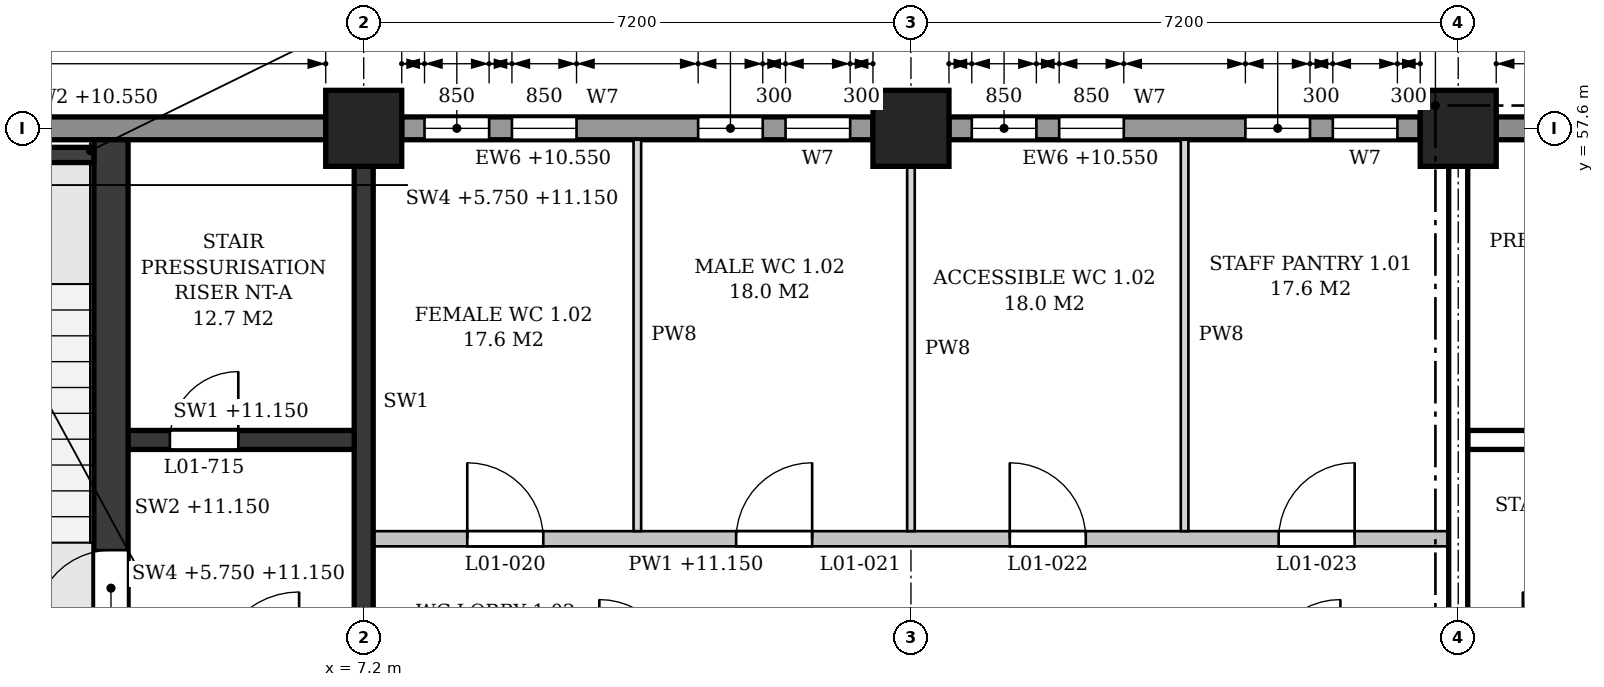
"""IFC4 building model, lengths in metres.
Left out: names, types, materials, properties, quantities, classifications, styles, units other than length and angle.
Written with IfcOpenShell. Run it as: python <this file> out.ifc"""

import sys

from ifc_helpers import new_model, si_unit, direction, frame, frame_2d, origin, origin_2d, place, context, subcontext, project, spatial, polyline, rectangle, outline, extrude, element, fill, save


model = new_model("IFC4")
c1 = context("Model", 3, precision=1e-05, world=origin(), true_north=direction((0.0, 1.0)))
c2 = subcontext(c1, "Body", "Model", "MODEL_VIEW")
j1 = project(units=[si_unit("LENGTHUNIT", "METRE"), si_unit("PLANEANGLEUNIT", "RADIAN")], contexts=[c1])
p1 = place(None, origin())
s1 = spatial("IfcSite", under=j1, at=p1, CompositionType="ELEMENT")
p2 = place(p1, origin())
s2 = spatial("IfcBuilding", under=s1, at=p2, CompositionType="ELEMENT")
p3 = place(p2, frame((0.0, 0.0, 6.0)))
s3 = spatial("IfcBuildingStorey", under=s2, at=p3, CompositionType="ELEMENT", Elevation=6.0)
for number, where, z_axis, x_axis in (
    (1, (7.2, 57.6, 0.0), (0.0, 0.0, 1.0), (1.0, 0.0, 0.0)),
    (2, (14.4, 57.6, 0.0), (0.0, 0.0, 1.0), (1.0, 0.0, 0.0)),
    (3, (21.6, 57.6, 0.0), (0.0, 0.0, 1.0), (1.0, 0.0, 0.0)),
):
    element("IfcColumn", number, at=place(p3, frame(where, z_axis=z_axis, x_axis=x_axis)), inside=s3, PredefinedType="COLUMN", context=c2, shape_type="SweptSolid", body=[
        extrude(rectangle(XDim=1.0, YDim=1.0, at=origin_2d()), origin(), (0.0, 0.0, 1.0), 5.4),
    ])
p4 = place(p3, frame((28.3, 57.6, 0.0), z_axis=(0.0, 0.0, 1.0), x_axis=(-1.0, 0.0, 0.0)))
e4 = element("IfcWall", 4, at=p4, inside=s3, PredefinedType="STANDARD", context=c2, shape_type="SweptSolid", body=[
    extrude(rectangle(XDim=6.2, YDim=0.3, at=frame_2d((3.1, 0.0))), origin(), (0.0, 0.0, 1.0), 4.55),
])
p5 = place(p4, frame((0.85, 0.0, 0.9)))
e5 = element("IfcOpeningElement", 5, at=p5, cuts=e4, PredefinedType="OPENING", context=c2, shape_type="SweptSolid", body=[
    extrude(outline(polyline([(0.0, 0.0), (0.9, 0.0), (0.9, 3.15), (0.45, 3.6), (0.0, 3.15), (0.0, 0.0)])), frame((0.0, 0.16, 0.0), z_axis=(0.0, -1.0, 0.0), x_axis=(1.0, 0.0, 0.0)), (0.0, 0.0, 1.0), 0.32),
])
p6 = place(p3, frame((21.1, 57.6, 0.0), z_axis=(0.0, 0.0, 1.0), x_axis=(-1.0, 0.0, 0.0)))
e6 = element("IfcWall", 6, at=p6, inside=s3, PredefinedType="STANDARD", context=c2, shape_type="SweptSolid", body=[
    extrude(rectangle(XDim=6.2, YDim=0.3, at=frame_2d((3.1, 0.0))), origin(), (0.0, 0.0, 1.0), 4.55),
])
p7 = place(p6, frame((0.3, 0.0, 0.9)))
e7 = element("IfcOpeningElement", 7, at=p7, cuts=e6, PredefinedType="OPENING", context=c2, shape_type="SweptSolid", body=[
    extrude(outline(polyline([(0.0, 0.0), (0.85, 0.0), (0.85, 3.15), (0.425, 3.6), (0.0, 3.15), (0.0, 0.0)])), frame((0.0, 0.16, 0.0), z_axis=(0.0, -1.0, 0.0), x_axis=(1.0, 0.0, 0.0)), (0.0, 0.0, 1.0), 0.32),
])
p8 = place(p6, frame((1.45, 0.0, 0.9)))
e8 = element("IfcOpeningElement", 8, at=p8, cuts=e6, PredefinedType="OPENING", context=c2, shape_type="SweptSolid", body=[
    extrude(outline(polyline([(0.0, 0.0), (0.85, 0.0), (0.85, 3.15), (0.425, 3.6), (0.0, 3.15), (0.0, 0.0)])), frame((0.0, 0.16, 0.0), z_axis=(0.0, -1.0, 0.0), x_axis=(1.0, 0.0, 0.0)), (0.0, 0.0, 1.0), 0.32),
])
p9 = place(p6, frame((3.9, 0.0, 0.9)))
e9 = element("IfcOpeningElement", 9, at=p9, cuts=e6, PredefinedType="OPENING", context=c2, shape_type="SweptSolid", body=[
    extrude(outline(polyline([(0.0, 0.0), (0.85, 0.0), (0.85, 3.15), (0.425, 3.6), (0.0, 3.15), (0.0, 0.0)])), frame((0.0, 0.16, 0.0), z_axis=(0.0, -1.0, 0.0), x_axis=(1.0, 0.0, 0.0)), (0.0, 0.0, 1.0), 0.32),
])
p10 = place(p6, frame((5.05, 0.0, 0.9)))
e10 = element("IfcOpeningElement", 10, at=p10, cuts=e6, PredefinedType="OPENING", context=c2, shape_type="SweptSolid", body=[
    extrude(outline(polyline([(0.0, 0.0), (0.85, 0.0), (0.85, 3.15), (0.425, 3.6), (0.0, 3.15), (0.0, 0.0)])), frame((0.0, 0.16, 0.0), z_axis=(0.0, -1.0, 0.0), x_axis=(1.0, 0.0, 0.0)), (0.0, 0.0, 1.0), 0.32),
])
p11 = place(p3, frame((13.9, 57.6, 0.0), z_axis=(0.0, 0.0, 1.0), x_axis=(-1.0, 0.0, 0.0)))
e11 = element("IfcWall", 11, at=p11, inside=s3, PredefinedType="STANDARD", context=c2, shape_type="SweptSolid", body=[
    extrude(rectangle(XDim=6.2, YDim=0.3, at=frame_2d((3.1, 0.0))), origin(), (0.0, 0.0, 1.0), 4.55),
])
p12 = place(p11, frame((0.3, 0.0, 0.9)))
e12 = element("IfcOpeningElement", 12, at=p12, cuts=e11, PredefinedType="OPENING", context=c2, shape_type="SweptSolid", body=[
    extrude(outline(polyline([(0.0, 0.0), (0.85, 0.0), (0.85, 3.15), (0.425, 3.6), (0.0, 3.15), (0.0, 0.0)])), frame((0.0, 0.16, 0.0), z_axis=(0.0, -1.0, 0.0), x_axis=(1.0, 0.0, 0.0)), (0.0, 0.0, 1.0), 0.32),
])
p13 = place(p11, frame((1.45, 0.0, 0.9)))
e13 = element("IfcOpeningElement", 13, at=p13, cuts=e11, PredefinedType="OPENING", context=c2, shape_type="SweptSolid", body=[
    extrude(outline(polyline([(0.0, 0.0), (0.85, 0.0), (0.85, 3.15), (0.425, 3.6), (0.0, 3.15), (0.0, 0.0)])), frame((0.0, 0.16, 0.0), z_axis=(0.0, -1.0, 0.0), x_axis=(1.0, 0.0, 0.0)), (0.0, 0.0, 1.0), 0.32),
])
p14 = place(p11, frame((3.9, 0.0, 0.9)))
e14 = element("IfcOpeningElement", 14, at=p14, cuts=e11, PredefinedType="OPENING", context=c2, shape_type="SweptSolid", body=[
    extrude(outline(polyline([(0.0, 0.0), (0.85, 0.0), (0.85, 3.15), (0.425, 3.6), (0.0, 3.15), (0.0, 0.0)])), frame((0.0, 0.16, 0.0), z_axis=(0.0, -1.0, 0.0), x_axis=(1.0, 0.0, 0.0)), (0.0, 0.0, 1.0), 0.32),
])
p15 = place(p11, frame((5.05, 0.0, 0.9)))
e15 = element("IfcOpeningElement", 15, at=p15, cuts=e11, PredefinedType="OPENING", context=c2, shape_type="SweptSolid", body=[
    extrude(outline(polyline([(0.0, 0.0), (0.85, 0.0), (0.85, 3.15), (0.425, 3.6), (0.0, 3.15), (0.0, 0.0)])), frame((0.0, 0.16, 0.0), z_axis=(0.0, -1.0, 0.0), x_axis=(1.0, 0.0, 0.0)), (0.0, 0.0, 1.0), 0.32),
])
p16 = place(p3, frame((6.7, 57.6, 0.0), z_axis=(0.0, 0.0, 1.0), x_axis=(-1.0, 0.0, 0.0)))
e16 = element("IfcWall", 16, at=p16, inside=s3, PredefinedType="STANDARD", context=c2, shape_type="SweptSolid", body=[
    extrude(rectangle(XDim=6.2, YDim=0.3, at=frame_2d((3.1, 0.0))), origin(), (0.0, 0.0, 1.0), 4.55),
])
p17 = place(p16, frame((4.45, 0.0, 0.9)))
e17 = element("IfcOpeningElement", 17, at=p17, cuts=e16, PredefinedType="OPENING", context=c2, shape_type="SweptSolid", body=[
    extrude(outline(polyline([(0.0, 0.0), (0.9, 0.0), (0.9, 3.15), (0.45, 3.6), (0.0, 3.15), (0.0, 0.0)])), frame((0.0, 0.16, 0.0), z_axis=(0.0, -1.0, 0.0), x_axis=(1.0, 0.0, 0.0)), (0.0, 0.0, 1.0), 0.32),
])
p18 = place(p3, frame((7.2, 50.9, 0.0), z_axis=(0.0, 0.0, 1.0), x_axis=(0.0, 1.0, 0.0)))
e18 = element("IfcWall", 18, at=p18, inside=s3, PredefinedType="SHEAR", context=c2, shape_type="SweptSolid", body=[
    extrude(rectangle(XDim=6.2, YDim=0.25, at=frame_2d((3.1, 0.0))), origin(), (0.0, 0.0, 1.0), 4.4),
])
p19 = place(p3, frame((2.25, 57.25, -0.25), z_axis=(0.0, 0.0, 1.0), x_axis=(1.0, 0.0, 0.0)))
e19 = element("IfcWall", 19, at=p19, inside=s3, PredefinedType="SHEAR", context=c2, shape_type="SweptSolid", body=[
    extrude(rectangle(XDim=1.4, YDim=0.2, at=frame_2d((0.7, 0.0))), origin(), (0.0, 0.0, 1.0), 5.4),
])
p20 = place(p3, frame((3.875, 50.525, 0.0), z_axis=(0.0, 0.0, 1.0), x_axis=(0.0, 1.0, 0.0)))
e20 = element("IfcWall", 20, at=p20, inside=s3, PredefinedType="SHEAR", context=c2, shape_type="SweptSolid", body=[
    extrude(rectangle(XDim=6.925, YDim=0.45, at=frame_2d((3.462, 0.0))), origin(), (0.0, 0.0, 1.0), 5.15),
])
p21 = place(p20, frame((0.525, 0.0, 0.0)))
e21 = element("IfcOpeningElement", 21, at=p21, cuts=e20, PredefinedType="OPENING", context=c2, shape_type="SweptSolid", body=[
    extrude(rectangle(XDim=1.0, YDim=2.1, at=frame_2d((0.5, 1.05))), frame((0.0, 0.235, 0.0), z_axis=(0.0, -1.0, 0.0), x_axis=(1.0, 0.0, 0.0)), (0.0, 0.0, 1.0), 0.47),
])
p22 = place(p3, frame((4.1, 53.5, 0.0), z_axis=(0.0, 0.0, 1.0), x_axis=(1.0, 0.0, 0.0)))
e22 = element("IfcWall", 22, at=p22, inside=s3, PredefinedType="SHEAR", context=c2, shape_type="SweptSolid", body=[
    extrude(rectangle(XDim=2.975, YDim=0.25, at=frame_2d((1.487, 0.0))), origin(), (0.0, 0.0, 1.0), 5.15),
])
p23 = place(p22, frame((0.55, 0.0, 0.0)))
e23 = element("IfcOpeningElement", 23, at=p23, cuts=e22, PredefinedType="OPENING", context=c2, shape_type="SweptSolid", body=[
    extrude(rectangle(XDim=0.9, YDim=2.1, at=frame_2d((0.45, 1.05))), frame((0.0, 0.135, 0.0), z_axis=(0.0, -1.0, 0.0), x_axis=(1.0, 0.0, 0.0)), (0.0, 0.0, 1.0), 0.27),
])
p24 = place(p3, frame((21.6, 50.9, 0.0), z_axis=(0.0, 0.0, 1.0), x_axis=(0.0, 1.0, 0.0)))
e24 = element("IfcWall", 24, at=p24, inside=s3, PredefinedType="SHEAR", context=c2, shape_type="SweptSolid", body=[
    extrude(rectangle(XDim=6.2, YDim=0.25, at=frame_2d((3.1, 0.0))), origin(), (0.0, 0.0, 1.0), 4.4),
])
p25 = place(p3, frame((21.725, 53.5, 0.0), z_axis=(0.0, 0.0, 1.0), x_axis=(1.0, 0.0, 0.0)))
e25 = element("IfcWall", 25, at=p25, inside=s3, PredefinedType="SHEAR", context=c2, shape_type="SweptSolid", body=[
    extrude(rectangle(XDim=2.975, YDim=0.25, at=frame_2d((1.487, 0.0))), origin(), (0.0, 0.0, 1.0), 5.15),
])
p26 = place(p25, frame((1.525, 0.0, 0.0)))
e26 = element("IfcOpeningElement", 26, at=p26, cuts=e25, PredefinedType="OPENING", context=c2, shape_type="SweptSolid", body=[
    extrude(rectangle(XDim=0.9, YDim=2.1, at=frame_2d((0.45, 1.05))), frame((0.0, 0.135, 0.0), z_axis=(0.0, -1.0, 0.0), x_axis=(1.0, 0.0, 0.0)), (0.0, 0.0, 1.0), 0.27),
])
p27 = place(p3, frame((7.325, 52.2, 0.0), z_axis=(0.0, 0.0, 1.0), x_axis=(1.0, 0.0, 0.0)))
e27 = element("IfcWall", 27, at=p27, inside=s3, PredefinedType="PARTITIONING", context=c2, shape_type="SweptSolid", body=[
    extrude(outline(polyline([(0.0, 0.0), (14.15, 0.0), (14.15, 4.4), (14.025, 4.4), (14.025, 5.15), (7.325, 5.15), (7.325, 4.4), (6.825, 4.4), (6.825, 5.15), (0.125, 5.15), (0.125, 4.4), (0.0, 4.4), (0.0, 0.0)])), frame((0.0, 0.1, 0.0), z_axis=(0.0, -1.0, 0.0), x_axis=(1.0, 0.0, 0.0)), (0.0, 0.0, 1.0), 0.2),
])
p28 = place(p27, frame((1.238, 0.0, 0.0)))
e28 = element("IfcOpeningElement", 28, at=p28, cuts=e27, PredefinedType="OPENING", context=c2, shape_type="SweptSolid", body=[
    extrude(rectangle(XDim=1.0, YDim=2.1, at=frame_2d((0.5, 1.05))), frame((0.0, 0.11, 0.0), z_axis=(0.0, -1.0, 0.0), x_axis=(1.0, 0.0, 0.0)), (0.0, 0.0, 1.0), 0.22),
])
p29 = place(p27, frame((4.775, 0.0, 0.0)))
e29 = element("IfcOpeningElement", 29, at=p29, cuts=e27, PredefinedType="OPENING", context=c2, shape_type="SweptSolid", body=[
    extrude(rectangle(XDim=1.0, YDim=2.1, at=frame_2d((0.5, 1.05))), frame((0.0, 0.11, 0.0), z_axis=(0.0, -1.0, 0.0), x_axis=(1.0, 0.0, 0.0)), (0.0, 0.0, 1.0), 0.22),
])
p30 = place(p27, frame((8.375, 0.0, 0.0)))
e30 = element("IfcOpeningElement", 30, at=p30, cuts=e27, PredefinedType="OPENING", context=c2, shape_type="SweptSolid", body=[
    extrude(rectangle(XDim=1.0, YDim=2.1, at=frame_2d((0.5, 1.05))), frame((0.0, 0.11, 0.0), z_axis=(0.0, -1.0, 0.0), x_axis=(1.0, 0.0, 0.0)), (0.0, 0.0, 1.0), 0.22),
])
p31 = place(p27, frame((11.913, 0.0, 0.0)))
e31 = element("IfcOpeningElement", 31, at=p31, cuts=e27, PredefinedType="OPENING", context=c2, shape_type="SweptSolid", body=[
    extrude(rectangle(XDim=1.0, YDim=2.1, at=frame_2d((0.5, 1.05))), frame((0.0, 0.11, 0.0), z_axis=(0.0, -1.0, 0.0), x_axis=(1.0, 0.0, 0.0)), (0.0, 0.0, 1.0), 0.22),
])
p32 = place(p3, frame((10.8, 52.3, 0.0), z_axis=(0.0, 0.0, 1.0), x_axis=(0.0, 1.0, 0.0)))
e32 = element("IfcWall", 32, at=p32, inside=s3, PredefinedType="PARTITIONING", context=c2, shape_type="SweptSolid", body=[
    extrude(rectangle(XDim=5.15, YDim=0.1, at=frame_2d((2.575, 0.0))), origin(), (0.0, 0.0, 1.0), 4.4),
])
p33 = place(p3, frame((14.4, 52.3, 0.0), z_axis=(0.0, 0.0, 1.0), x_axis=(0.0, 1.0, 0.0)))
e33 = element("IfcWall", 33, at=p33, inside=s3, PredefinedType="PARTITIONING", context=c2, shape_type="SweptSolid", body=[
    extrude(rectangle(XDim=4.8, YDim=0.1, at=frame_2d((2.4, 0.0))), origin(), (0.0, 0.0, 1.0), 4.4),
])
p34 = place(p3, frame((18.0, 52.3, 0.0), z_axis=(0.0, 0.0, 1.0), x_axis=(0.0, 1.0, 0.0)))
e34 = element("IfcWall", 34, at=p34, inside=s3, PredefinedType="PARTITIONING", context=c2, shape_type="SweptSolid", body=[
    extrude(rectangle(XDim=5.15, YDim=0.1, at=frame_2d((2.575, 0.0))), origin(), (0.0, 0.0, 1.0), 4.4),
])
p35 = place(p7, origin())
e35 = element("IfcWindow", 35, at=p35, inside=s3, PartitioningType="SINGLE_PANEL", PredefinedType="WINDOW", context=c2, shape_type="SweptSolid", body=[
    extrude(outline(polyline([(0.0, 0.0), (0.85, 0.0), (0.85, 3.15), (0.425, 3.6), (0.0, 3.15), (0.0, 0.0)])), frame((0.0, 0.03, 0.0), z_axis=(0.0, -1.0, 0.0), x_axis=(1.0, 0.0, 0.0)), (0.0, 0.0, 1.0), 0.06),
])
fill(e7, e35)
p36 = place(p8, origin())
e36 = element("IfcWindow", 36, at=p36, inside=s3, PartitioningType="SINGLE_PANEL", PredefinedType="WINDOW", context=c2, shape_type="SweptSolid", body=[
    extrude(outline(polyline([(0.0, 0.0), (0.85, 0.0), (0.85, 3.15), (0.425, 3.6), (0.0, 3.15), (0.0, 0.0)])), frame((0.0, 0.03, 0.0), z_axis=(0.0, -1.0, 0.0), x_axis=(1.0, 0.0, 0.0)), (0.0, 0.0, 1.0), 0.06),
])
fill(e8, e36)
p37 = place(p9, origin())
e37 = element("IfcWindow", 37, at=p37, inside=s3, PartitioningType="SINGLE_PANEL", PredefinedType="WINDOW", context=c2, shape_type="SweptSolid", body=[
    extrude(outline(polyline([(0.0, 0.0), (0.85, 0.0), (0.85, 3.15), (0.425, 3.6), (0.0, 3.15), (0.0, 0.0)])), frame((0.0, 0.03, 0.0), z_axis=(0.0, -1.0, 0.0), x_axis=(1.0, 0.0, 0.0)), (0.0, 0.0, 1.0), 0.06),
])
fill(e9, e37)
p38 = place(p10, origin())
e38 = element("IfcWindow", 38, at=p38, inside=s3, PartitioningType="SINGLE_PANEL", PredefinedType="WINDOW", context=c2, shape_type="SweptSolid", body=[
    extrude(outline(polyline([(0.0, 0.0), (0.85, 0.0), (0.85, 3.15), (0.425, 3.6), (0.0, 3.15), (0.0, 0.0)])), frame((0.0, 0.03, 0.0), z_axis=(0.0, -1.0, 0.0), x_axis=(1.0, 0.0, 0.0)), (0.0, 0.0, 1.0), 0.06),
])
fill(e10, e38)
p39 = place(p12, origin())
e39 = element("IfcWindow", 39, at=p39, inside=s3, PartitioningType="SINGLE_PANEL", PredefinedType="WINDOW", context=c2, shape_type="SweptSolid", body=[
    extrude(outline(polyline([(0.0, 0.0), (0.85, 0.0), (0.85, 3.15), (0.425, 3.6), (0.0, 3.15), (0.0, 0.0)])), frame((0.0, 0.03, 0.0), z_axis=(0.0, -1.0, 0.0), x_axis=(1.0, 0.0, 0.0)), (0.0, 0.0, 1.0), 0.06),
])
fill(e12, e39)
p40 = place(p13, origin())
e40 = element("IfcWindow", 40, at=p40, inside=s3, PartitioningType="SINGLE_PANEL", PredefinedType="WINDOW", context=c2, shape_type="SweptSolid", body=[
    extrude(outline(polyline([(0.0, 0.0), (0.85, 0.0), (0.85, 3.15), (0.425, 3.6), (0.0, 3.15), (0.0, 0.0)])), frame((0.0, 0.03, 0.0), z_axis=(0.0, -1.0, 0.0), x_axis=(1.0, 0.0, 0.0)), (0.0, 0.0, 1.0), 0.06),
])
fill(e13, e40)
p41 = place(p14, origin())
e41 = element("IfcWindow", 41, at=p41, inside=s3, PartitioningType="SINGLE_PANEL", PredefinedType="WINDOW", context=c2, shape_type="SweptSolid", body=[
    extrude(outline(polyline([(0.0, 0.0), (0.85, 0.0), (0.85, 3.15), (0.425, 3.6), (0.0, 3.15), (0.0, 0.0)])), frame((0.0, 0.03, 0.0), z_axis=(0.0, -1.0, 0.0), x_axis=(1.0, 0.0, 0.0)), (0.0, 0.0, 1.0), 0.06),
])
fill(e14, e41)
p42 = place(p15, origin())
e42 = element("IfcWindow", 42, at=p42, inside=s3, PartitioningType="SINGLE_PANEL", PredefinedType="WINDOW", context=c2, shape_type="SweptSolid", body=[
    extrude(outline(polyline([(0.0, 0.0), (0.85, 0.0), (0.85, 3.15), (0.425, 3.6), (0.0, 3.15), (0.0, 0.0)])), frame((0.0, 0.03, 0.0), z_axis=(0.0, -1.0, 0.0), x_axis=(1.0, 0.0, 0.0)), (0.0, 0.0, 1.0), 0.06),
])
fill(e15, e42)
p43 = place(p21, origin())
e43 = element("IfcDoor", 43, at=p43, inside=s3, OperationType="SINGLE_SWING_LEFT", PredefinedType="DOOR", context=c2, shape_type="SweptSolid", body=[
    extrude(rectangle(XDim=1.0, YDim=2.1, at=frame_2d((0.5, 1.05))), frame((0.0, 0.025, 0.0), z_axis=(0.0, -1.0, 0.0), x_axis=(1.0, 0.0, 0.0)), (0.0, 0.0, 1.0), 0.05),
])
fill(e21, e43)
p44 = place(p23, origin())
e44 = element("IfcDoor", 44, at=p44, inside=s3, OperationType="SINGLE_SWING_RIGHT", PredefinedType="DOOR", context=c2, shape_type="SweptSolid", body=[
    extrude(rectangle(XDim=0.9, YDim=2.1, at=frame_2d((0.45, 1.05))), frame((0.0, 0.025, 0.0), z_axis=(0.0, -1.0, 0.0), x_axis=(1.0, 0.0, 0.0)), (0.0, 0.0, 1.0), 0.05),
])
fill(e23, e44)
p45 = place(p28, origin())
e45 = element("IfcDoor", 45, at=p45, inside=s3, OperationType="SINGLE_SWING_LEFT", PredefinedType="DOOR", context=c2, shape_type="SweptSolid", body=[
    extrude(rectangle(XDim=1.0, YDim=2.1, at=frame_2d((0.5, 1.05))), frame((0.0, 0.025, 0.0), z_axis=(0.0, -1.0, 0.0), x_axis=(1.0, 0.0, 0.0)), (0.0, 0.0, 1.0), 0.05),
])
fill(e28, e45)
p46 = place(p29, origin())
e46 = element("IfcDoor", 46, at=p46, inside=s3, OperationType="SINGLE_SWING_RIGHT", PredefinedType="DOOR", context=c2, shape_type="SweptSolid", body=[
    extrude(rectangle(XDim=1.0, YDim=2.1, at=frame_2d((0.5, 1.05))), frame((0.0, 0.025, 0.0), z_axis=(0.0, -1.0, 0.0), x_axis=(1.0, 0.0, 0.0)), (0.0, 0.0, 1.0), 0.05),
])
fill(e29, e46)
p47 = place(p30, origin())
e47 = element("IfcDoor", 47, at=p47, inside=s3, OperationType="SINGLE_SWING_LEFT", PredefinedType="DOOR", context=c2, shape_type="SweptSolid", body=[
    extrude(rectangle(XDim=1.0, YDim=2.1, at=frame_2d((0.5, 1.05))), frame((0.0, 0.025, 0.0), z_axis=(0.0, -1.0, 0.0), x_axis=(1.0, 0.0, 0.0)), (0.0, 0.0, 1.0), 0.05),
])
fill(e30, e47)
p48 = place(p31, origin())
e48 = element("IfcDoor", 48, at=p48, inside=s3, OperationType="SINGLE_SWING_RIGHT", PredefinedType="DOOR", context=c2, shape_type="SweptSolid", body=[
    extrude(rectangle(XDim=1.0, YDim=2.1, at=frame_2d((0.5, 1.05))), frame((0.0, 0.025, 0.0), z_axis=(0.0, -1.0, 0.0), x_axis=(1.0, 0.0, 0.0)), (0.0, 0.0, 1.0), 0.05),
])
fill(e31, e48)
save(model, sys.argv[1])
